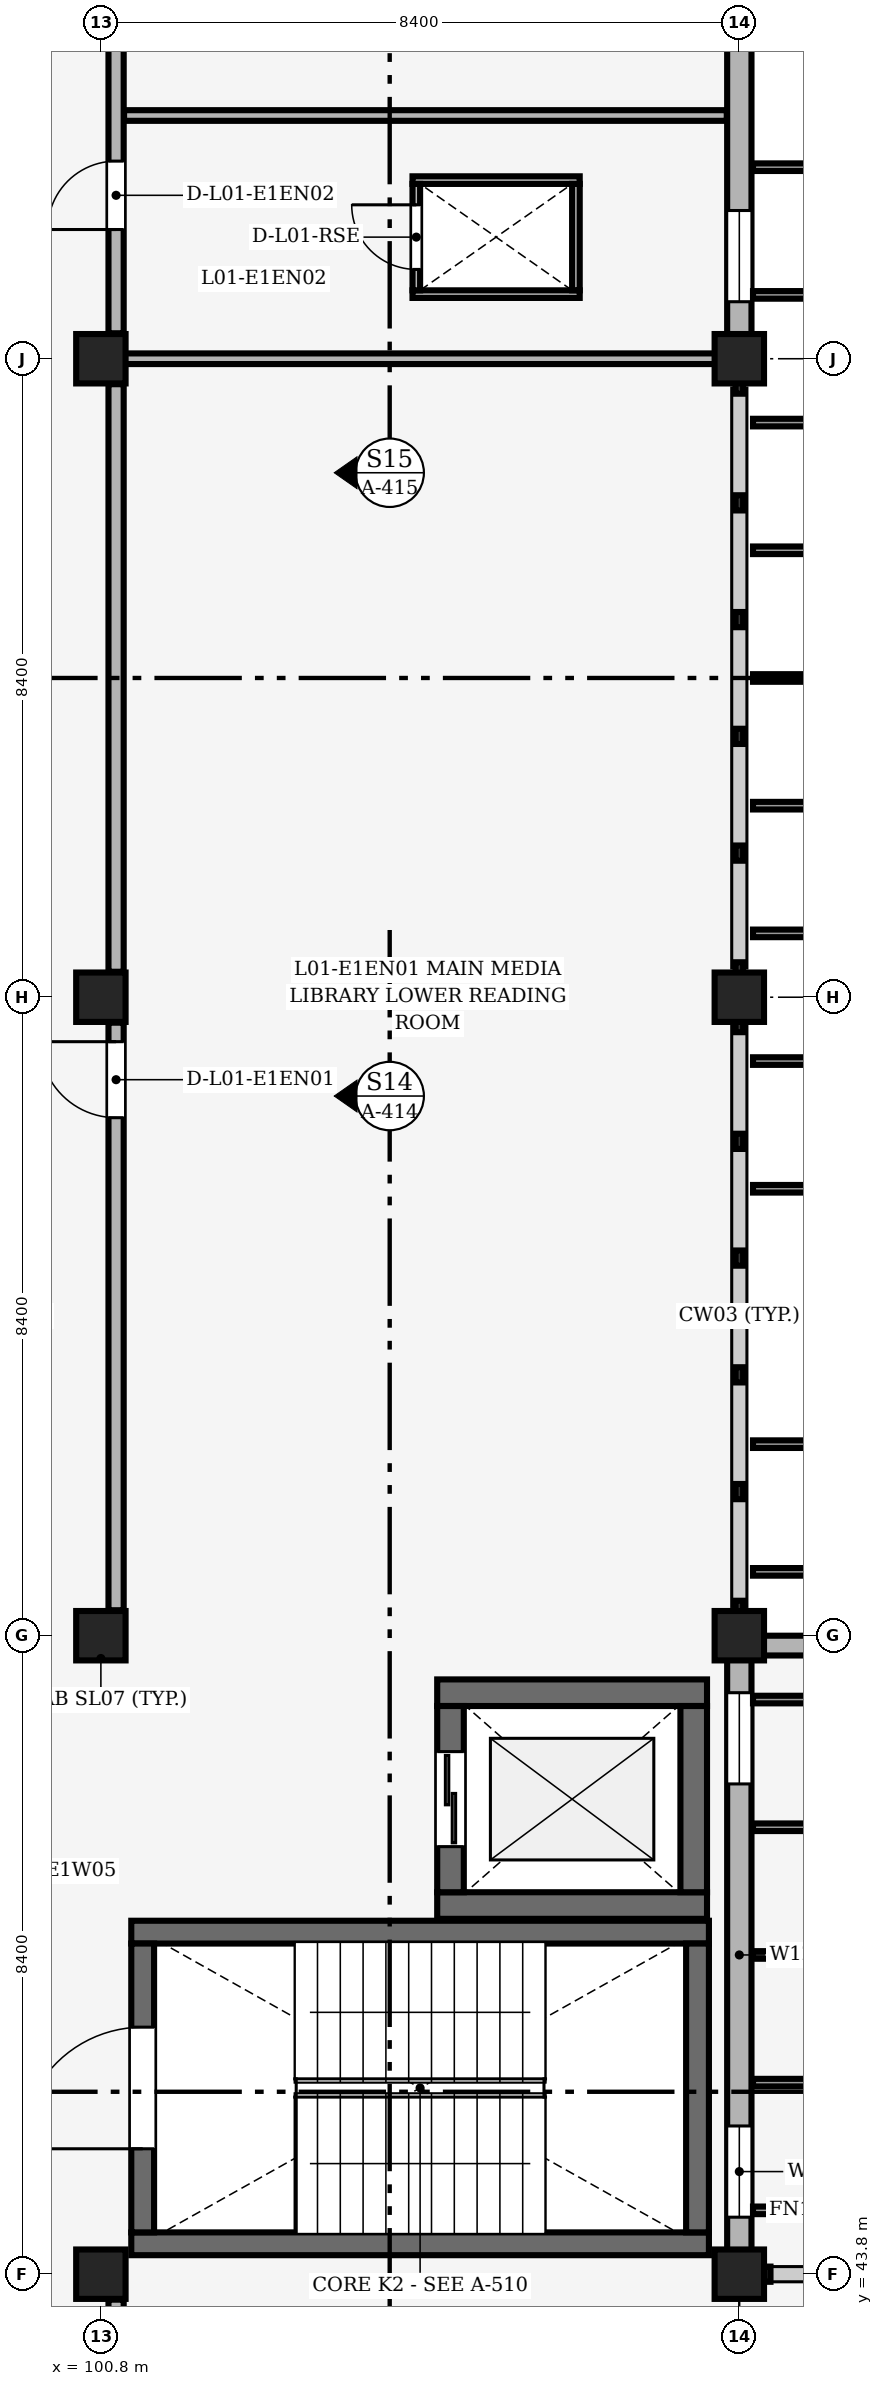
"""IFC4 building model, lengths in metres.
Left out: names, types, materials, properties, quantities, classifications, styles, units other than length and angle.
Written with IfcOpenShell. Run it as: python <this file> out.ifc"""

import sys

from ifc_helpers import new_model, si_unit, direction, frame, frame_2d, origin, origin_2d, place, context, subcontext, project, spatial, rectangle, extrude, element, fill, save


model = new_model("IFC4")
c1 = context("Model", 3, precision=1e-05, world=origin(), true_north=direction((0.0, 1.0)))
c2 = subcontext(c1, "Body", "Model", "MODEL_VIEW")
j1 = project(units=[si_unit("LENGTHUNIT", "METRE"), si_unit("PLANEANGLEUNIT", "RADIAN")], contexts=[c1])
p1 = place(None, origin())
s1 = spatial("IfcSite", under=j1, at=p1, CompositionType="ELEMENT")
p2 = place(p1, origin())
s2 = spatial("IfcBuilding", under=s1, at=p2, CompositionType="ELEMENT")
p3 = place(p2, frame((0.0, 0.0, 4.8)))
s3 = spatial("IfcBuildingStorey", under=s2, at=p3, CompositionType="ELEMENT", Elevation=4.8)
for number, where, z_axis, x_axis in (
    (1, (100.8, 43.8, 0.0), (0.0, 0.0, 1.0), (1.0, 0.0, 0.0)),
    (2, (100.8, 52.2, 0.0), (0.0, 0.0, 1.0), (1.0, 0.0, 0.0)),
    (3, (100.8, 60.6, 0.0), (0.0, 0.0, 1.0), (1.0, 0.0, 0.0)),
    (4, (100.8, 69.0, 0.0), (0.0, 0.0, 1.0), (1.0, 0.0, 0.0)),
    (5, (109.2, 43.8, 0.0), (0.0, 0.0, 1.0), (1.0, 0.0, 0.0)),
    (6, (109.2, 52.2, 0.0), (0.0, 0.0, 1.0), (1.0, 0.0, 0.0)),
    (7, (109.2, 60.6, 0.0), (0.0, 0.0, 1.0), (1.0, 0.0, 0.0)),
    (8, (109.2, 69.0, 0.0), (0.0, 0.0, 1.0), (1.0, 0.0, 0.0)),
):
    element("IfcColumn", number, at=place(p3, frame(where, z_axis=z_axis, x_axis=x_axis)), inside=s3, PredefinedType="COLUMN", context=c2, shape_type="SweptSolid", body=[
        extrude(rectangle(XDim=0.65, YDim=0.65, at=origin_2d()), origin(), (0.0, 0.0, 1.0), 4.2),
    ])
p4 = place(p3, frame((109.2, 44.1, 0.0), z_axis=(0.0, 0.0, 1.0), x_axis=(0.0, 1.0, 0.0)))
e9 = element("IfcWall", 9, at=p4, inside=s3, PredefinedType="SOLIDWALL", context=c2, shape_type="SweptSolid", body=[
    extrude(rectangle(XDim=7.8, YDim=0.32, at=frame_2d((3.9, 0.0))), origin(), (0.0, 0.0, 1.0), 3.3),
])
p5 = place(p4, frame((0.45, 0.0, 0.85)))
e10 = element("IfcOpeningElement", 10, at=p5, cuts=e9, PredefinedType="OPENING", context=c2, shape_type="SweptSolid", body=[
    extrude(rectangle(XDim=1.2, YDim=1.8, at=frame_2d((0.6, 0.9))), frame((0.0, 0.17, 0.0), z_axis=(0.0, -1.0, 0.0), x_axis=(1.0, 0.0, 0.0)), (0.0, 0.0, 1.0), 0.34),
])
p6 = place(p4, frame((6.15, 0.0, 0.85)))
e11 = element("IfcOpeningElement", 11, at=p6, cuts=e9, PredefinedType="OPENING", context=c2, shape_type="SweptSolid", body=[
    extrude(rectangle(XDim=1.2, YDim=1.8, at=frame_2d((0.6, 0.9))), frame((0.0, 0.17, 0.0), z_axis=(0.0, -1.0, 0.0), x_axis=(1.0, 0.0, 0.0)), (0.0, 0.0, 1.0), 0.34),
])
p7 = place(p3, frame((109.2, 69.3, 0.0), z_axis=(0.0, 0.0, 1.0), x_axis=(0.0, 1.0, 0.0)))
e12 = element("IfcWall", 12, at=p7, inside=s3, PredefinedType="SOLIDWALL", context=c2, shape_type="SweptSolid", body=[
    extrude(rectangle(XDim=7.8, YDim=0.32, at=frame_2d((3.9, 0.0))), origin(), (0.0, 0.0, 1.0), 3.25),
])
p8 = place(p7, frame((0.45, 0.0, 0.85)))
e13 = element("IfcOpeningElement", 13, at=p8, cuts=e12, PredefinedType="OPENING", context=c2, shape_type="SweptSolid", body=[
    extrude(rectangle(XDim=1.2, YDim=1.8, at=frame_2d((0.6, 0.9))), frame((0.0, 0.17, 0.0), z_axis=(0.0, -1.0, 0.0), x_axis=(1.0, 0.0, 0.0)), (0.0, 0.0, 1.0), 0.34),
])
p9 = place(p7, frame((6.15, 0.0, 0.85)))
e14 = element("IfcOpeningElement", 14, at=p9, cuts=e12, PredefinedType="OPENING", context=c2, shape_type="SweptSolid", body=[
    extrude(rectangle(XDim=1.2, YDim=1.8, at=frame_2d((0.6, 0.9))), frame((0.0, 0.17, 0.0), z_axis=(0.0, -1.0, 0.0), x_axis=(1.0, 0.0, 0.0)), (0.0, 0.0, 1.0), 0.34),
])
p10 = place(p3, frame((109.33, 52.07, 0.0), z_axis=(0.0, 0.0, 1.0), x_axis=(1.0, 0.0, 0.0)))
e15 = element("IfcWall", 15, at=p10, inside=s3, PredefinedType="PARAPET", context=c2, shape_type="SweptSolid", body=[
    extrude(rectangle(XDim=33.34, YDim=0.26, at=frame_2d((16.67, 0.0))), origin(), (0.0, 0.0, 1.0), 0.85),
])
for number, where, z_axis, x_axis in (
    (16, (101.2, 44.2, 0.0), (0.0, 0.0, 1.0), (1.0, 0.0, 0.0)),
    (17, (101.2, 48.3, 0.0), (0.0, 0.0, 1.0), (1.0, 0.0, 0.0)),
):
    element("IfcWall", number, at=place(p3, frame(where, z_axis=z_axis, x_axis=x_axis)), inside=s3, PredefinedType="SHEAR", context=c2, shape_type="SweptSolid", body=[
        extrude(rectangle(XDim=7.6, YDim=0.3, at=frame_2d((3.8, 0.0))), origin(), (0.0, 0.0, 1.0), 4.025),
    ])
p11 = place(p3, frame((101.35, 44.35, 0.0), z_axis=(0.0, 0.0, 1.0), x_axis=(0.0, 1.0, 0.0)))
e18 = element("IfcWall", 18, at=p11, inside=s3, PredefinedType="SHEAR", context=c2, shape_type="SweptSolid", body=[
    extrude(rectangle(XDim=3.8, YDim=0.3, at=frame_2d((1.9, 0.0))), origin(), (0.0, 0.0, 1.0), 4.025),
])
p12 = place(p11, frame((1.1, 0.0, 0.0)))
e19 = element("IfcOpeningElement", 19, at=p12, cuts=e18, PredefinedType="OPENING", context=c2, shape_type="SweptSolid", body=[
    extrude(rectangle(XDim=1.6, YDim=2.2, at=frame_2d((0.8, 1.1))), frame((0.0, 0.16, 0.0), z_axis=(0.0, -1.0, 0.0), x_axis=(1.0, 0.0, 0.0)), (0.0, 0.0, 1.0), 0.32),
])
p13 = place(p3, frame((108.65, 44.35, 0.0), z_axis=(0.0, 0.0, 1.0), x_axis=(0.0, 1.0, 0.0)))
e20 = element("IfcWall", 20, at=p13, inside=s3, PredefinedType="SHEAR", context=c2, shape_type="SweptSolid", body=[
    extrude(rectangle(XDim=3.8, YDim=0.3, at=frame_2d((1.9, 0.0))), origin(), (0.0, 0.0, 1.0), 4.025),
])
for number, where, z_axis, x_axis in (
    (21, (105.225, 48.65, 0.0), (0.0, 0.0, 1.0), (1.0, 0.0, 0.0)),
    (22, (105.225, 51.45, 0.0), (0.0, 0.0, 1.0), (1.0, 0.0, 0.0)),
):
    element("IfcWall", number, at=place(p3, frame(where, z_axis=z_axis, x_axis=x_axis)), inside=s3, PredefinedType="SHEAR", context=c2, shape_type="SweptSolid", body=[
        extrude(rectangle(XDim=3.55, YDim=0.35, at=frame_2d((1.775, 0.0))), origin(), (0.0, 0.0, 1.0), 3.92),
    ])
p14 = place(p3, frame((105.4, 48.825, 0.0), z_axis=(0.0, 0.0, 1.0), x_axis=(0.0, 1.0, 0.0)))
e23 = element("IfcWall", 23, at=p14, inside=s3, PredefinedType="SHEAR", context=c2, shape_type="SweptSolid", body=[
    extrude(rectangle(XDim=2.45, YDim=0.35, at=frame_2d((1.225, 0.0))), origin(), (0.0, 0.0, 1.0), 3.92),
])
p15 = place(p14, frame((0.6, 0.0, 0.0)))
e24 = element("IfcOpeningElement", 24, at=p15, cuts=e23, PredefinedType="OPENING", context=c2, shape_type="SweptSolid", body=[
    extrude(rectangle(XDim=1.25, YDim=2.25, at=frame_2d((0.625, 1.125))), frame((0.0, 0.185, 0.0), z_axis=(0.0, -1.0, 0.0), x_axis=(1.0, 0.0, 0.0)), (0.0, 0.0, 1.0), 0.37),
])
p16 = place(p3, frame((108.6, 48.825, 0.0), z_axis=(0.0, 0.0, 1.0), x_axis=(0.0, 1.0, 0.0)))
e25 = element("IfcWall", 25, at=p16, inside=s3, PredefinedType="SHEAR", context=c2, shape_type="SweptSolid", body=[
    extrude(rectangle(XDim=2.45, YDim=0.35, at=frame_2d((1.225, 0.0))), origin(), (0.0, 0.0, 1.0), 3.92),
])
for number, where, z_axis, x_axis in (
    (26, (104.9, 69.85, 0.0), (0.0, 0.0, 1.0), (1.0, 0.0, 0.0)),
    (27, (104.9, 71.35, 0.0), (0.0, 0.0, 1.0), (1.0, 0.0, 0.0)),
):
    element("IfcWall", number, at=place(p3, frame(where, z_axis=z_axis, x_axis=x_axis)), inside=s3, PredefinedType="PARTITIONING", context=c2, shape_type="SweptSolid", body=[
        extrude(rectangle(XDim=2.2, YDim=0.1, at=frame_2d((1.1, 0.0))), origin(), (0.0, 0.0, 1.0), 3.9),
    ])
p17 = place(p3, frame((104.95, 69.9, 0.0), z_axis=(0.0, 0.0, 1.0), x_axis=(0.0, 1.0, 0.0)))
e28 = element("IfcWall", 28, at=p17, inside=s3, PredefinedType="PARTITIONING", context=c2, shape_type="SweptSolid", body=[
    extrude(rectangle(XDim=1.4, YDim=0.1, at=frame_2d((0.7, 0.0))), origin(), (0.0, 0.0, 1.0), 3.9),
])
p18 = place(p17, frame((0.275, 0.0, 0.0)))
e29 = element("IfcOpeningElement", 29, at=p18, cuts=e28, PredefinedType="OPENING", context=c2, shape_type="SweptSolid", body=[
    extrude(rectangle(XDim=0.85, YDim=2.05, at=frame_2d((0.425, 1.025))), frame((0.0, 0.06, 0.0), z_axis=(0.0, -1.0, 0.0), x_axis=(1.0, 0.0, 0.0)), (0.0, 0.0, 1.0), 0.12),
])
p19 = place(p3, frame((107.05, 69.9, 0.0), z_axis=(0.0, 0.0, 1.0), x_axis=(0.0, 1.0, 0.0)))
e30 = element("IfcWall", 30, at=p19, inside=s3, PredefinedType="PARTITIONING", context=c2, shape_type="SweptSolid", body=[
    extrude(rectangle(XDim=1.4, YDim=0.1, at=frame_2d((0.7, 0.0))), origin(), (0.0, 0.0, 1.0), 3.9),
])
p20 = place(p3, frame((101.0, 35.735, 0.0), z_axis=(0.0, 0.0, 1.0), x_axis=(0.0, 1.0, 0.0)))
e31 = element("IfcWall", 31, at=p20, inside=s3, PredefinedType="PARTITIONING", context=c2, shape_type="SweptSolid", body=[
    extrude(rectangle(XDim=7.73, YDim=0.2, at=frame_2d((3.865, 0.0))), origin(), (0.0, 0.0, 1.0), 3.1),
])
p21 = place(p20, frame((1.14, 0.0, 0.0)))
e32 = element("IfcOpeningElement", 32, at=p21, cuts=e31, PredefinedType="OPENING", context=c2, shape_type="SweptSolid", body=[
    extrude(rectangle(XDim=1.05, YDim=2.2, at=frame_2d((0.525, 1.1))), frame((0.0, 0.11, 0.0), z_axis=(0.0, -1.0, 0.0), x_axis=(1.0, 0.0, 0.0)), (0.0, 0.0, 1.0), 0.22),
])
p22 = place(p3, frame((101.105, 69.0, 0.0), z_axis=(0.0, 0.0, 1.0), x_axis=(1.0, 0.0, 0.0)))
e33 = element("IfcWall", 33, at=p22, inside=s3, PredefinedType="PARTITIONING", context=c2, shape_type="SweptSolid", body=[
    extrude(rectangle(XDim=7.99, YDim=0.14, at=frame_2d((3.995, 0.0))), origin(), (0.0, 0.0, 1.0), 3.15),
])
p23 = place(p3, frame((101.105, 72.2, 0.0), z_axis=(0.0, 0.0, 1.0), x_axis=(1.0, 0.0, 0.0)))
e34 = element("IfcWall", 34, at=p23, inside=s3, PredefinedType="PARTITIONING", context=c2, shape_type="SweptSolid", body=[
    extrude(rectangle(XDim=7.93, YDim=0.14, at=frame_2d((3.965, 0.0))), origin(), (0.0, 0.0, 1.0), 3.9),
])
p24 = place(p3, frame((101.0, 52.535, 0.0), z_axis=(0.0, 0.0, 1.0), x_axis=(0.0, 1.0, 0.0)))
e35 = element("IfcWall", 35, at=p24, inside=s3, PredefinedType="PARTITIONING", context=c2, shape_type="SweptSolid", body=[
    extrude(rectangle(XDim=7.73, YDim=0.2, at=frame_2d((3.865, 0.0))), origin(), (0.0, 0.0, 1.0), 3.1),
])
p25 = place(p24, frame((6.48, 0.0, 0.0)))
e36 = element("IfcOpeningElement", 36, at=p25, cuts=e35, PredefinedType="OPENING", context=c2, shape_type="SweptSolid", body=[
    extrude(rectangle(XDim=1.0, YDim=2.15, at=frame_2d((0.5, 1.075))), frame((0.0, 0.11, 0.0), z_axis=(0.0, -1.0, 0.0), x_axis=(1.0, 0.0, 0.0)), (0.0, 0.0, 1.0), 0.22),
])
p26 = place(p3, frame((101.0, 60.935, 0.0), z_axis=(0.0, 0.0, 1.0), x_axis=(0.0, 1.0, 0.0)))
e37 = element("IfcWall", 37, at=p26, inside=s3, PredefinedType="PARTITIONING", context=c2, shape_type="SweptSolid", body=[
    extrude(rectangle(XDim=7.73, YDim=0.2, at=frame_2d((3.865, 0.0))), origin(), (0.0, 0.0, 1.0), 3.05),
])
p27 = place(p3, frame((101.0, 69.335, 0.0), z_axis=(0.0, 0.0, 1.0), x_axis=(0.0, 1.0, 0.0)))
e38 = element("IfcWall", 38, at=p27, inside=s3, PredefinedType="PARTITIONING", context=c2, shape_type="SweptSolid", body=[
    extrude(rectangle(XDim=7.73, YDim=0.2, at=frame_2d((3.865, 0.0))), origin(), (0.0, 0.0, 1.0), 3.05),
])
p28 = place(p27, frame((1.365, 0.0, 0.0)))
e39 = element("IfcOpeningElement", 39, at=p28, cuts=e38, PredefinedType="OPENING", context=c2, shape_type="SweptSolid", body=[
    extrude(rectangle(XDim=0.9, YDim=2.1, at=frame_2d((0.45, 1.05))), frame((0.0, 0.11, 0.0), z_axis=(0.0, -1.0, 0.0), x_axis=(1.0, 0.0, 0.0)), (0.0, 0.0, 1.0), 0.22),
])
p29 = place(p27, frame((4.94, 0.0, 0.0)))
e40 = element("IfcOpeningElement", 40, at=p29, cuts=e38, PredefinedType="OPENING", context=c2, shape_type="SweptSolid", body=[
    extrude(rectangle(XDim=1.05, YDim=2.2, at=frame_2d((0.525, 1.1))), frame((0.0, 0.11, 0.0), z_axis=(0.0, -1.0, 0.0), x_axis=(1.0, 0.0, 0.0)), (0.0, 0.0, 1.0), 0.22),
])
p30 = place(p5, origin())
e41 = element("IfcWindow", 41, at=p30, inside=s3, PartitioningType="SINGLE_PANEL", PredefinedType="WINDOW", context=c2, shape_type="SweptSolid", body=[
    extrude(rectangle(XDim=1.2, YDim=1.8, at=frame_2d((0.6, 0.9))), frame((0.0, 0.03, 0.0), z_axis=(0.0, -1.0, 0.0), x_axis=(1.0, 0.0, 0.0)), (0.0, 0.0, 1.0), 0.06),
])
fill(e10, e41)
p31 = place(p6, origin())
e42 = element("IfcWindow", 42, at=p31, inside=s3, PartitioningType="SINGLE_PANEL", PredefinedType="WINDOW", context=c2, shape_type="SweptSolid", body=[
    extrude(rectangle(XDim=1.2, YDim=1.8, at=frame_2d((0.6, 0.9))), frame((0.0, 0.03, 0.0), z_axis=(0.0, -1.0, 0.0), x_axis=(1.0, 0.0, 0.0)), (0.0, 0.0, 1.0), 0.06),
])
fill(e11, e42)
p32 = place(p8, origin())
e43 = element("IfcWindow", 43, at=p32, inside=s3, PartitioningType="SINGLE_PANEL", PredefinedType="WINDOW", context=c2, shape_type="SweptSolid", body=[
    extrude(rectangle(XDim=1.2, YDim=1.8, at=frame_2d((0.6, 0.9))), frame((0.0, 0.03, 0.0), z_axis=(0.0, -1.0, 0.0), x_axis=(1.0, 0.0, 0.0)), (0.0, 0.0, 1.0), 0.06),
])
fill(e13, e43)
p33 = place(p12, origin())
e44 = element("IfcDoor", 44, at=p33, inside=s3, OperationType="DOUBLE_DOOR_SINGLE_SWING", PredefinedType="DOOR", context=c2, shape_type="SweptSolid", body=[
    extrude(rectangle(XDim=1.6, YDim=2.2, at=frame_2d((0.8, 1.1))), frame((0.0, 0.025, 0.0), z_axis=(0.0, -1.0, 0.0), x_axis=(1.0, 0.0, 0.0)), (0.0, 0.0, 1.0), 0.05),
])
fill(e19, e44)
p34 = place(p15, origin())
e45 = element("IfcDoor", 45, at=p34, inside=s3, OperationType="DOUBLE_DOOR_SLIDING", PredefinedType="DOOR", context=c2, shape_type="SweptSolid", body=[
    extrude(rectangle(XDim=1.25, YDim=2.25, at=frame_2d((0.625, 1.125))), frame((0.0, 0.025, 0.0), z_axis=(0.0, -1.0, 0.0), x_axis=(1.0, 0.0, 0.0)), (0.0, 0.0, 1.0), 0.05),
])
fill(e24, e45)
p35 = place(p18, origin())
e46 = element("IfcDoor", 46, at=p35, inside=s3, OperationType="SINGLE_SWING_RIGHT", PredefinedType="DOOR", context=c2, shape_type="SweptSolid", body=[
    extrude(rectangle(XDim=0.85, YDim=2.05, at=frame_2d((0.425, 1.025))), frame((0.0, 0.025, 0.0), z_axis=(0.0, -1.0, 0.0), x_axis=(1.0, 0.0, 0.0)), (0.0, 0.0, 1.0), 0.05),
])
fill(e29, e46)
p36 = place(p25, origin())
e47 = element("IfcDoor", 47, at=p36, inside=s3, OperationType="SINGLE_SWING_RIGHT", PredefinedType="DOOR", context=c2, shape_type="SweptSolid", body=[
    extrude(rectangle(XDim=1.0, YDim=2.15, at=frame_2d((0.5, 1.075))), frame((0.0, 0.025, 0.0), z_axis=(0.0, -1.0, 0.0), x_axis=(1.0, 0.0, 0.0)), (0.0, 0.0, 1.0), 0.05),
])
fill(e36, e47)
p37 = place(p28, origin())
e48 = element("IfcDoor", 48, at=p37, inside=s3, OperationType="SINGLE_SWING_LEFT", PredefinedType="DOOR", context=c2, shape_type="SweptSolid", body=[
    extrude(rectangle(XDim=0.9, YDim=2.1, at=frame_2d((0.45, 1.05))), frame((0.0, 0.025, 0.0), z_axis=(0.0, -1.0, 0.0), x_axis=(1.0, 0.0, 0.0)), (0.0, 0.0, 1.0), 0.05),
])
fill(e39, e48)
save(model, sys.argv[1])
